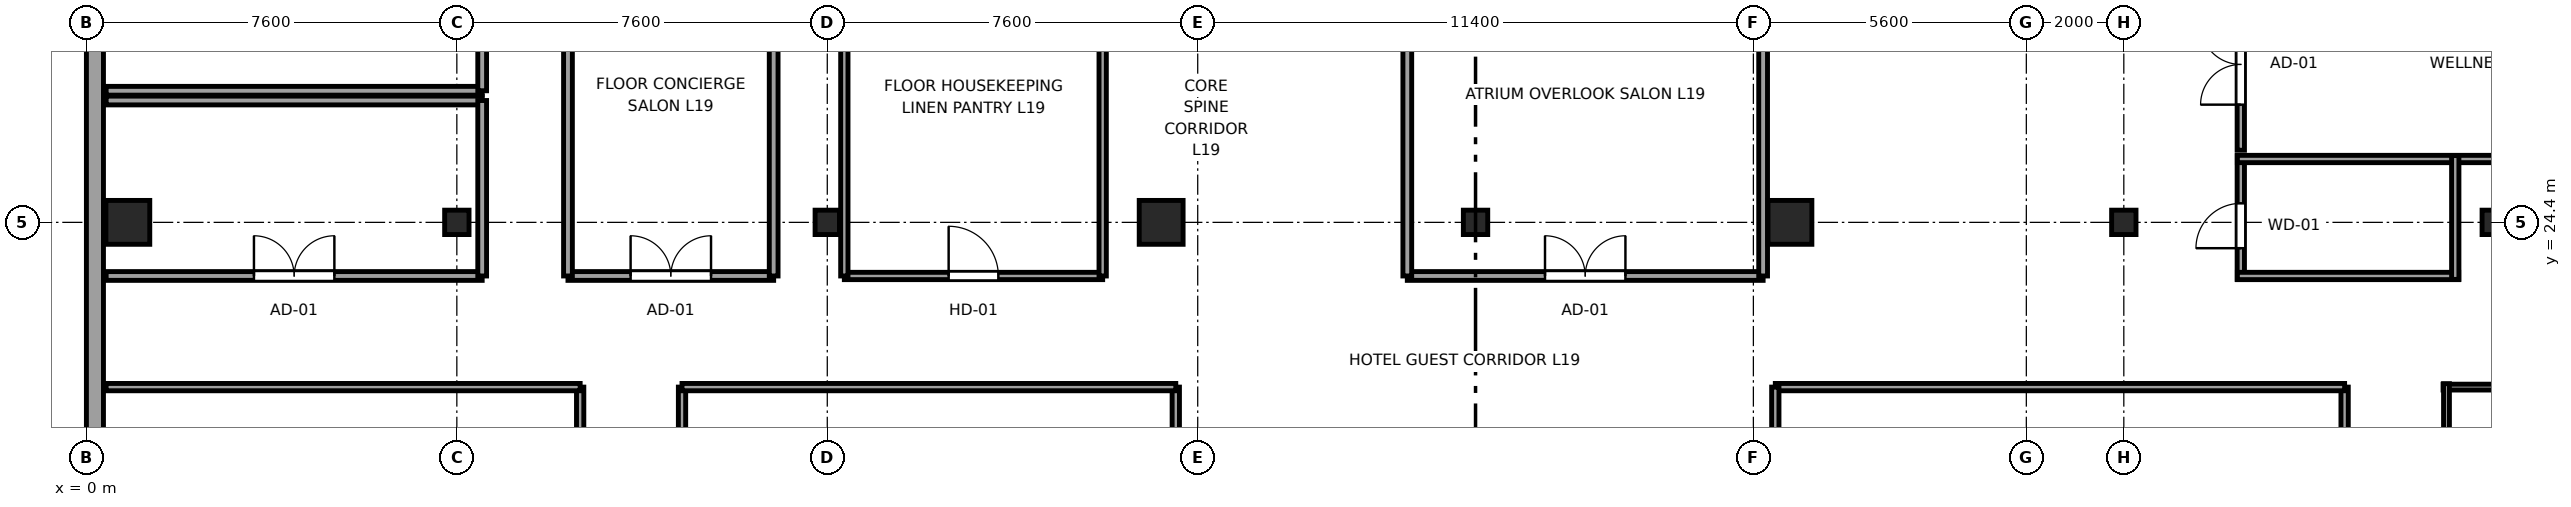
"""IFC4 building model, lengths in metres.
Left out: names, types, materials, properties, quantities, classifications, styles, units other than length and angle.
Written with IfcOpenShell. Run it as: python <this file> out.ifc"""

import sys

from ifc_helpers import new_model, si_unit, direction, frame, frame_2d, origin, origin_2d, place, context, subcontext, project, spatial, rectangle, i_section, extrude, source, transform, mapped, element, fill, save


model = new_model("IFC4")
c1 = context("Model", 3, precision=1e-05, world=origin(), true_north=direction((0.0, 1.0)))
c2 = subcontext(c1, "Body", "Model", "MODEL_VIEW")
j1 = project(units=[si_unit("LENGTHUNIT", "METRE"), si_unit("PLANEANGLEUNIT", "RADIAN")], contexts=[c1])
p1 = place(None, origin())
s1 = spatial("IfcSite", under=j1, at=p1, CompositionType="ELEMENT")
p2 = place(p1, origin())
s2 = spatial("IfcBuilding", under=s1, at=p2, CompositionType="ELEMENT")
p3 = place(p2, frame((0.0, 0.0, 78.15)))
s3 = spatial("IfcBuildingStorey", under=s2, at=p3, CompositionType="ELEMENT", Elevation=78.15)
m1 = source(origin(), c2, "Body", "SweptSolid", [
    extrude(rectangle(XDim=0.9, YDim=0.9, at=origin_2d()), origin(), (0.0, 0.0, 1.0), 3.55),
])
p4 = place(p3, frame((0.85, 24.4, 0.0), z_axis=(0.0, 0.0, 1.0), x_axis=(1.0, 0.0, 0.0)))
e1 = element("IfcColumn", 1, at=p4, inside=s3, PredefinedType="COLUMN", context=c2, shape_type="MappedRepresentation", body=[
    mapped(m1, transform((0.0, 0.0, 0.0), x_axis=(1.0, 0.0, 0.0), y_axis=(0.0, 1.0, 0.0), z_axis=(0.0, 0.0, 1.0), scale=1.0)),
])
m2 = source(origin(), c2, "Body", "SweptSolid", [
    extrude(i_section(OverallWidth=0.5, OverallDepth=0.5, WebThickness=0.022, FlangeThickness=0.034, at=origin_2d()), origin(), (0.0, 0.0, 1.0), 3.55),
])
for number, where, z_axis, x_axis in (
    (2, (7.6, 24.4, 0.0), (0.0, 0.0, 1.0), (1.0, 0.0, 0.0)),
    (3, (15.2, 24.4, 0.0), (0.0, 0.0, 1.0), (1.0, 0.0, 0.0)),
):
    element("IfcColumn", number, at=place(p3, frame(where, z_axis=z_axis, x_axis=x_axis)), inside=s3, PredefinedType="COLUMN", context=c2, shape_type="MappedRepresentation", body=[
        mapped(m2, transform((0.0, 0.0, 0.0), x_axis=(1.0, 0.0, 0.0), y_axis=(0.0, 1.0, 0.0), z_axis=(0.0, 0.0, 1.0), scale=1.0)),
    ])
for number, where, z_axis, x_axis in (
    (4, (22.05, 24.4, 0.0), (0.0, 0.0, 1.0), (1.0, 0.0, 0.0)),
    (5, (34.95, 24.4, 0.0), (0.0, 0.0, 1.0), (1.0, 0.0, 0.0)),
):
    element("IfcColumn", number, at=place(p3, frame(where, z_axis=z_axis, x_axis=x_axis)), inside=s3, PredefinedType="COLUMN", context=c2, shape_type="MappedRepresentation", body=[
        mapped(m1, transform((0.0, 0.0, 0.0), x_axis=(1.0, 0.0, 0.0), y_axis=(0.0, 1.0, 0.0), z_axis=(0.0, 0.0, 1.0), scale=1.0)),
    ])
for number, where, z_axis, x_axis in (
    (6, (41.8, 24.4, 0.0), (0.0, 0.0, 1.0), (1.0, 0.0, 0.0)),
    (7, (49.4, 24.4, 0.0), (0.0, 0.0, 1.0), (1.0, 0.0, 0.0)),
    (8, (28.5, 24.4, 0.0), (0.0, 0.0, 1.0), (1.0, 0.0, 0.0)),
):
    element("IfcColumn", number, at=place(p3, frame(where, z_axis=z_axis, x_axis=x_axis)), inside=s3, PredefinedType="COLUMN", context=c2, shape_type="MappedRepresentation", body=[
        mapped(m2, transform((0.0, 0.0, 0.0), x_axis=(1.0, 0.0, 0.0), y_axis=(0.0, 1.0, 0.0), z_axis=(0.0, 0.0, 1.0), scale=1.0)),
    ])
p5 = place(p3, frame((0.175, 41.383, 0.0), z_axis=(0.0, 0.0, 1.0), x_axis=(0.0, -1.0, 0.0)))
e9 = element("IfcWall", 9, at=p5, inside=s3, PredefinedType="SOLIDWALL", context=c2, shape_type="SweptSolid", body=[
    extrude(rectangle(XDim=36.766, YDim=0.35, at=frame_2d((18.383, 0.0))), origin(), (0.0, 0.0, 1.0), 3.37),
])
p6 = place(p5, frame((1.601, 0.0, 0.68)))
e10 = element("IfcOpeningElement", 10, at=p6, cuts=e9, PredefinedType="OPENING", context=c2, shape_type="SweptSolid", body=[
    extrude(rectangle(XDim=1.95, YDim=1.82, at=frame_2d((0.975, 0.91))), frame((0.0, 0.185, 0.0), z_axis=(0.0, -1.0, 0.0), x_axis=(1.0, 0.0, 0.0)), (0.0, 0.0, 1.0), 0.37),
])
p7 = place(p5, frame((4.503, 0.0, 0.68)))
e11 = element("IfcOpeningElement", 11, at=p7, cuts=e9, PredefinedType="OPENING", context=c2, shape_type="SweptSolid", body=[
    extrude(rectangle(XDim=1.95, YDim=1.82, at=frame_2d((0.975, 0.91))), frame((0.0, 0.185, 0.0), z_axis=(0.0, -1.0, 0.0), x_axis=(1.0, 0.0, 0.0)), (0.0, 0.0, 1.0), 0.37),
])
p8 = place(p5, frame((21.36, 0.0, 0.68)))
e12 = element("IfcOpeningElement", 12, at=p8, cuts=e9, PredefinedType="OPENING", context=c2, shape_type="SweptSolid", body=[
    extrude(rectangle(XDim=1.95, YDim=1.82, at=frame_2d((0.975, 0.91))), frame((0.0, 0.185, 0.0), z_axis=(0.0, -1.0, 0.0), x_axis=(1.0, 0.0, 0.0)), (0.0, 0.0, 1.0), 0.37),
])
p9 = place(p5, frame((26.361, 0.0, 0.68)))
e13 = element("IfcOpeningElement", 13, at=p9, cuts=e9, PredefinedType="OPENING", context=c2, shape_type="SweptSolid", body=[
    extrude(rectangle(XDim=1.95, YDim=1.82, at=frame_2d((0.975, 0.91))), frame((0.0, 0.185, 0.0), z_axis=(0.0, -1.0, 0.0), x_axis=(1.0, 0.0, 0.0)), (0.0, 0.0, 1.0), 0.37),
])
p10 = place(p5, frame((32.333, 0.0, 0.62)))
e14 = element("IfcOpeningElement", 14, at=p10, cuts=e9, PredefinedType="OPENING", context=c2, shape_type="SweptSolid", body=[
    extrude(rectangle(XDim=1.5, YDim=1.55, at=frame_2d((0.75, 0.775))), frame((0.0, 0.185, 0.0), z_axis=(0.0, -1.0, 0.0), x_axis=(1.0, 0.0, 0.0)), (0.0, 0.0, 1.0), 0.37),
])
p11 = place(p5, frame((11.733, 0.0, 0.62)))
e15 = element("IfcOpeningElement", 15, at=p11, cuts=e9, PredefinedType="OPENING", context=c2, shape_type="SweptSolid", body=[
    extrude(rectangle(XDim=1.5, YDim=1.55, at=frame_2d((0.75, 0.775))), frame((0.0, 0.185, 0.0), z_axis=(0.0, -1.0, 0.0), x_axis=(1.0, 0.0, 0.0)), (0.0, 0.0, 1.0), 0.37),
])
p12 = place(p3, frame((48.35, 21.02, 0.0), z_axis=(0.0, 0.0, 1.0), x_axis=(1.0, 0.0, 0.0)))
e16 = element("IfcWall", 16, at=p12, inside=s3, PredefinedType="PLUMBINGWALL", context=c2, shape_type="SweptSolid", body=[
    extrude(rectangle(XDim=2.59, YDim=0.12, at=frame_2d((1.295, 0.0))), origin(), (0.0, 0.0, 1.0), 3.37),
])
p13 = place(p3, frame((48.42, 18.7, 0.0), z_axis=(0.0, 0.0, 1.0), x_axis=(0.0, 1.0, 0.0)))
e17 = element("IfcWall", 17, at=p13, inside=s3, PredefinedType="PLUMBINGWALL", context=c2, shape_type="SweptSolid", body=[
    extrude(rectangle(XDim=2.39, YDim=0.12, at=frame_2d((1.195, 0.0))), origin(), (0.0, 0.0, 1.0), 3.37),
])
p14 = place(p3, frame((10.13, 18.21, 0.0), z_axis=(0.0, 0.0, 1.0), x_axis=(0.0, 1.0, 0.0)))
e18 = element("IfcWall", 18, at=p14, inside=s3, PredefinedType="PARTITIONING", context=c2, shape_type="SweptSolid", body=[
    extrude(rectangle(XDim=2.81, YDim=0.15, at=frame_2d((1.405, 0.0))), origin(), (0.0, 0.0, 1.0), 3.37),
])
p15 = place(p14, frame((0.895, 0.0, 0.0)))
e19 = element("IfcOpeningElement", 19, at=p15, cuts=e18, PredefinedType="OPENING", context=c2, shape_type="SweptSolid", body=[
    extrude(rectangle(XDim=0.98, YDim=2.12, at=frame_2d((0.49, 1.06))), frame((0.0, 0.085, 0.0), z_axis=(0.0, -1.0, 0.0), x_axis=(1.0, 0.0, 0.0)), (0.0, 0.0, 1.0), 0.17),
])
p16 = place(p3, frame((0.405, 21.02, 0.0), z_axis=(0.0, 0.0, 1.0), x_axis=(1.0, 0.0, 0.0)))
e20 = element("IfcWall", 20, at=p16, inside=s3, PredefinedType="PARTITIONING", context=c2, shape_type="SweptSolid", body=[
    extrude(rectangle(XDim=9.725, YDim=0.15, at=frame_2d((4.862, 0.0))), origin(), (0.0, 0.0, 1.0), 3.37),
])
p17 = place(p3, frame((12.22, 17.01, 0.0), z_axis=(0.0, 0.0, 1.0), x_axis=(0.0, 1.0, 0.0)))
e21 = element("IfcWall", 21, at=p17, inside=s3, PredefinedType="PARTITIONING", context=c2, shape_type="SweptSolid", body=[
    extrude(rectangle(XDim=4.01, YDim=0.15, at=frame_2d((2.005, 0.0))), origin(), (0.0, 0.0, 1.0), 3.37),
])
p18 = place(p17, frame((1.495, 0.0, 0.0)))
e22 = element("IfcOpeningElement", 22, at=p18, cuts=e21, PredefinedType="OPENING", context=c2, shape_type="SweptSolid", body=[
    extrude(rectangle(XDim=0.98, YDim=2.12, at=frame_2d((0.49, 1.06))), frame((0.0, 0.085, 0.0), z_axis=(0.0, -1.0, 0.0), x_axis=(1.0, 0.0, 0.0)), (0.0, 0.0, 1.0), 0.17),
])
p19 = place(p3, frame((22.35, 14.68, 0.0), z_axis=(0.0, 0.0, 1.0), x_axis=(0.0, 1.0, 0.0)))
e23 = element("IfcWall", 23, at=p19, inside=s3, PredefinedType="PARTITIONING", context=c2, shape_type="SweptSolid", body=[
    extrude(rectangle(XDim=6.34, YDim=0.15, at=frame_2d((3.17, 0.0))), origin(), (0.0, 0.0, 1.0), 3.37),
])
p20 = place(p3, frame((12.22, 21.02, 0.0), z_axis=(0.0, 0.0, 1.0), x_axis=(1.0, 0.0, 0.0)))
e24 = element("IfcWall", 24, at=p20, inside=s3, PredefinedType="PARTITIONING", context=c2, shape_type="SweptSolid", body=[
    extrude(rectangle(XDim=10.13, YDim=0.15, at=frame_2d((5.065, 0.0))), origin(), (0.0, 0.0, 1.0), 3.37),
])
p21 = place(p3, frame((46.33, 17.41, 0.0), z_axis=(0.0, 0.0, 1.0), x_axis=(0.0, 1.0, 0.0)))
e25 = element("IfcWall", 25, at=p21, inside=s3, PredefinedType="PARTITIONING", context=c2, shape_type="SweptSolid", body=[
    extrude(rectangle(XDim=3.61, YDim=0.15, at=frame_2d((1.805, 0.0))), origin(), (0.0, 0.0, 1.0), 3.37),
])
p22 = place(p21, frame((1.295, 0.0, 0.0)))
e26 = element("IfcOpeningElement", 26, at=p22, cuts=e25, PredefinedType="OPENING", context=c2, shape_type="SweptSolid", body=[
    extrude(rectangle(XDim=0.98, YDim=2.12, at=frame_2d((0.49, 1.06))), frame((0.0, 0.085, 0.0), z_axis=(0.0, -1.0, 0.0), x_axis=(1.0, 0.0, 0.0)), (0.0, 0.0, 1.0), 0.17),
])
p23 = place(p3, frame((34.65, 21.02, 0.0), z_axis=(0.0, 0.0, 1.0), x_axis=(1.0, 0.0, 0.0)))
e27 = element("IfcWall", 27, at=p23, inside=s3, PredefinedType="PARTITIONING", context=c2, shape_type="SweptSolid", body=[
    extrude(rectangle(XDim=11.68, YDim=0.15, at=frame_2d((5.84, 0.0))), origin(), (0.0, 0.0, 1.0), 3.37),
])
p24 = place(p3, frame((34.65, 15.08, 0.0), z_axis=(0.0, 0.0, 1.0), x_axis=(0.0, 1.0, 0.0)))
e28 = element("IfcWall", 28, at=p24, inside=s3, PredefinedType="PARTITIONING", context=c2, shape_type="SweptSolid", body=[
    extrude(rectangle(XDim=5.94, YDim=0.15, at=frame_2d((2.97, 0.0))), origin(), (0.0, 0.0, 1.0), 3.37),
])
p25 = place(p3, frame((0.405, 23.3, 0.0), z_axis=(0.0, 0.0, 1.0), x_axis=(1.0, 0.0, 0.0)))
e29 = element("IfcWall", 29, at=p25, inside=s3, PredefinedType="PARTITIONING", context=c2, shape_type="SweptSolid", body=[
    extrude(rectangle(XDim=7.715, YDim=0.18, at=frame_2d((3.857, 0.0))), origin(), (0.0, 0.0, 1.0), 3.37),
])
p26 = place(p25, frame((3.032, 0.0, 0.0)))
e30 = element("IfcOpeningElement", 30, at=p26, cuts=e29, PredefinedType="OPENING", context=c2, shape_type="SweptSolid", body=[
    extrude(rectangle(XDim=1.65, YDim=2.15, at=frame_2d((0.825, 1.075))), frame((0.0, 0.1, 0.0), z_axis=(0.0, -1.0, 0.0), x_axis=(1.0, 0.0, 0.0)), (0.0, 0.0, 1.0), 0.2),
])
p27 = place(p3, frame((0.405, 26.9, 0.0), z_axis=(0.0, 0.0, 1.0), x_axis=(1.0, 0.0, 0.0)))
e31 = element("IfcWall", 31, at=p27, inside=s3, PredefinedType="PARTITIONING", context=c2, shape_type="SweptSolid", body=[
    extrude(rectangle(XDim=7.715, YDim=0.18, at=frame_2d((3.857, 0.0))), origin(), (0.0, 0.0, 1.0), 3.37),
])
p28 = place(p3, frame((8.12, 23.3, 0.0), z_axis=(0.0, 0.0, 1.0), x_axis=(0.0, 1.0, 0.0)))
e32 = element("IfcWall", 32, at=p28, inside=s3, PredefinedType="PARTITIONING", context=c2, shape_type="SweptSolid", body=[
    extrude(rectangle(XDim=3.6, YDim=0.18, at=frame_2d((1.8, 0.0))), origin(), (0.0, 0.0, 1.0), 3.37),
])
p29 = place(p3, frame((0.405, 27.1, 0.0), z_axis=(0.0, 0.0, 1.0), x_axis=(1.0, 0.0, 0.0)))
e33 = element("IfcWall", 33, at=p29, inside=s3, PredefinedType="PARTITIONING", context=c2, shape_type="SweptSolid", body=[
    extrude(rectangle(XDim=7.715, YDim=0.18, at=frame_2d((3.857, 0.0))), origin(), (0.0, 0.0, 1.0), 3.37),
])
p30 = place(p3, frame((8.12, 27.1, 0.0), z_axis=(0.0, 0.0, 1.0), x_axis=(0.0, 1.0, 0.0)))
e34 = element("IfcWall", 34, at=p30, inside=s3, PredefinedType="PARTITIONING", context=c2, shape_type="SweptSolid", body=[
    extrude(rectangle(XDim=3.6, YDim=0.18, at=frame_2d((1.8, 0.0))), origin(), (0.0, 0.0, 1.0), 3.37),
])
p31 = place(p30, frame((0.975, 0.0, 0.0)))
e35 = element("IfcOpeningElement", 35, at=p31, cuts=e34, PredefinedType="OPENING", context=c2, shape_type="SweptSolid", body=[
    extrude(rectangle(XDim=1.65, YDim=2.15, at=frame_2d((0.825, 1.075))), frame((0.0, 0.1, 0.0), z_axis=(0.0, -1.0, 0.0), x_axis=(1.0, 0.0, 0.0)), (0.0, 0.0, 1.0), 0.2),
])
p32 = place(p3, frame((44.2, 23.23, 0.0), z_axis=(0.0, 0.0, 1.0), x_axis=(0.0, 1.0, 0.0)))
e36 = element("IfcWall", 36, at=p32, inside=s3, PredefinedType="PARTITIONING", context=c2, shape_type="SweptSolid", body=[
    extrude(rectangle(XDim=2.54, YDim=0.15, at=frame_2d((1.27, 0.0))), origin(), (0.0, 0.0, 1.0), 3.37),
])
p33 = place(p32, frame((0.64, 0.0, 0.0)))
e37 = element("IfcOpeningElement", 37, at=p33, cuts=e36, PredefinedType="OPENING", context=c2, shape_type="SweptSolid", body=[
    extrude(rectangle(XDim=0.92, YDim=2.01, at=frame_2d((0.46, 1.005))), frame((0.0, 0.085, 0.0), z_axis=(0.0, -1.0, 0.0), x_axis=(1.0, 0.0, 0.0)), (0.0, 0.0, 1.0), 0.17),
])
p34 = place(p3, frame((44.13, 23.3, 0.0), z_axis=(0.0, 0.0, 1.0), x_axis=(1.0, 0.0, 0.0)))
e38 = element("IfcWall", 38, at=p34, inside=s3, PredefinedType="PARTITIONING", context=c2, shape_type="SweptSolid", body=[
    extrude(rectangle(XDim=4.54, YDim=0.15, at=frame_2d((2.27, 0.0))), origin(), (0.0, 0.0, 1.0), 3.37),
])
p35 = place(p3, frame((44.13, 25.7, 0.0), z_axis=(0.0, 0.0, 1.0), x_axis=(1.0, 0.0, 0.0)))
e39 = element("IfcWall", 39, at=p35, inside=s3, PredefinedType="PARTITIONING", context=c2, shape_type="SweptSolid", body=[
    extrude(rectangle(XDim=12.57, YDim=0.15, at=frame_2d((6.285, 0.0))), origin(), (0.0, 0.0, 1.0), 3.37),
])
p36 = place(p3, frame((48.6, 23.23, 0.0), z_axis=(0.0, 0.0, 1.0), x_axis=(0.0, 1.0, 0.0)))
e40 = element("IfcWall", 40, at=p36, inside=s3, PredefinedType="PARTITIONING", context=c2, shape_type="SweptSolid", body=[
    extrude(rectangle(XDim=2.54, YDim=0.15, at=frame_2d((1.27, 0.0))), origin(), (0.0, 0.0, 1.0), 3.37),
])
p37 = place(p3, frame((44.2, 25.88, 0.0), z_axis=(0.0, 0.0, 1.0), x_axis=(0.0, 1.0, 0.0)))
e41 = element("IfcWall", 41, at=p37, inside=s3, PredefinedType="PARTITIONING", context=c2, shape_type="SweptSolid", body=[
    extrude(rectangle(XDim=3.52, YDim=0.15, at=frame_2d((1.76, 0.0))), origin(), (0.0, 0.0, 1.0), 3.37),
])
p38 = place(p37, frame((0.935, 0.0, 0.0)))
e42 = element("IfcOpeningElement", 42, at=p38, cuts=e41, PredefinedType="OPENING", context=c2, shape_type="SweptSolid", body=[
    extrude(rectangle(XDim=1.65, YDim=2.15, at=frame_2d((0.825, 1.075))), frame((0.0, 0.085, 0.0), z_axis=(0.0, -1.0, 0.0), x_axis=(1.0, 0.0, 0.0)), (0.0, 0.0, 1.0), 0.17),
])
p39 = place(p3, frame((9.88, 23.3, 0.0), z_axis=(0.0, 0.0, 1.0), x_axis=(1.0, 0.0, 0.0)))
e43 = element("IfcWall", 43, at=p39, inside=s3, PredefinedType="PARTITIONING", context=c2, shape_type="SweptSolid", body=[
    extrude(rectangle(XDim=4.22, YDim=0.18, at=frame_2d((2.11, 0.0))), origin(), (0.0, 0.0, 1.0), 3.37),
])
p40 = place(p39, frame((1.285, 0.0, 0.0)))
e44 = element("IfcOpeningElement", 44, at=p40, cuts=e43, PredefinedType="OPENING", context=c2, shape_type="SweptSolid", body=[
    extrude(rectangle(XDim=1.65, YDim=2.15, at=frame_2d((0.825, 1.075))), frame((0.0, 0.1, 0.0), z_axis=(0.0, -1.0, 0.0), x_axis=(1.0, 0.0, 0.0)), (0.0, 0.0, 1.0), 0.2),
])
for number, where, z_axis, x_axis in (
    (45, (9.88, 23.3, 0.0), (0.0, 0.0, 1.0), (0.0, 1.0, 0.0)),
    (46, (14.1, 23.3, 0.0), (0.0, 0.0, 1.0), (0.0, 1.0, 0.0)),
):
    element("IfcWall", number, at=place(p3, frame(where, z_axis=z_axis, x_axis=x_axis)), inside=s3, PredefinedType="PARTITIONING", context=c2, shape_type="SweptSolid", body=[
        extrude(rectangle(XDim=6.45, YDim=0.18, at=frame_2d((3.225, 0.0))), origin(), (0.0, 0.0, 1.0), 3.37),
    ])
p41 = place(p3, frame((27.1, 23.3, 0.0), z_axis=(0.0, 0.0, 1.0), x_axis=(1.0, 0.0, 0.0)))
e47 = element("IfcWall", 47, at=p41, inside=s3, PredefinedType="PARTITIONING", context=c2, shape_type="SweptSolid", body=[
    extrude(rectangle(XDim=7.3, YDim=0.18, at=frame_2d((3.65, 0.0))), origin(), (0.0, 0.0, 1.0), 3.37),
])
p42 = place(p41, frame((2.825, 0.0, 0.0)))
e48 = element("IfcOpeningElement", 48, at=p42, cuts=e47, PredefinedType="OPENING", context=c2, shape_type="SweptSolid", body=[
    extrude(rectangle(XDim=1.65, YDim=2.15, at=frame_2d((0.825, 1.075))), frame((0.0, 0.1, 0.0), z_axis=(0.0, -1.0, 0.0), x_axis=(1.0, 0.0, 0.0)), (0.0, 0.0, 1.0), 0.2),
])
for number, where, z_axis, x_axis in (
    (49, (27.1, 23.3, 0.0), (0.0, 0.0, 1.0), (0.0, 1.0, 0.0)),
    (50, (34.4, 23.3, 0.0), (0.0, 0.0, 1.0), (0.0, 1.0, 0.0)),
):
    element("IfcWall", number, at=place(p3, frame(where, z_axis=z_axis, x_axis=x_axis)), inside=s3, PredefinedType="PARTITIONING", context=c2, shape_type="SweptSolid", body=[
        extrude(rectangle(XDim=6.5, YDim=0.18, at=frame_2d((3.25, 0.0))), origin(), (0.0, 0.0, 1.0), 3.37),
    ])
p43 = place(p3, frame((15.55, 23.3, 0.0), z_axis=(0.0, 0.0, 1.0), x_axis=(1.0, 0.0, 0.0)))
e51 = element("IfcWall", 51, at=p43, inside=s3, PredefinedType="PARTITIONING", context=c2, shape_type="SweptSolid", body=[
    extrude(rectangle(XDim=5.3, YDim=0.15, at=frame_2d((2.65, 0.0))), origin(), (0.0, 0.0, 1.0), 3.37),
])
p44 = place(p43, frame((2.14, 0.0, 0.0)))
e52 = element("IfcOpeningElement", 52, at=p44, cuts=e51, PredefinedType="OPENING", context=c2, shape_type="SweptSolid", body=[
    extrude(rectangle(XDim=1.02, YDim=2.03, at=frame_2d((0.51, 1.015))), frame((0.0, 0.085, 0.0), z_axis=(0.0, -1.0, 0.0), x_axis=(1.0, 0.0, 0.0)), (0.0, 0.0, 1.0), 0.17),
])
for number, where, z_axis, x_axis in (
    (53, (15.55, 23.3, 0.0), (0.0, 0.0, 1.0), (0.0, 1.0, 0.0)),
    (54, (20.85, 23.3, 0.0), (0.0, 0.0, 1.0), (0.0, 1.0, 0.0)),
):
    element("IfcWall", number, at=place(p3, frame(where, z_axis=z_axis, x_axis=x_axis)), inside=s3, PredefinedType="PARTITIONING", context=c2, shape_type="SweptSolid", body=[
        extrude(rectangle(XDim=6.5, YDim=0.15, at=frame_2d((3.25, 0.0))), origin(), (0.0, 0.0, 1.0), 3.37),
    ])
m3 = source(origin(), c2, "Body", "SweptSolid", [
    extrude(rectangle(XDim=1.65, YDim=2.15, at=frame_2d((0.825, 1.075))), frame((0.0, 0.025, 0.0), z_axis=(0.0, -1.0, 0.0), x_axis=(1.0, 0.0, 0.0)), (0.0, 0.0, 1.0), 0.05),
])
p45 = place(p26, origin())
e55 = element("IfcDoor", 55, at=p45, inside=s3, OperationType="DOUBLE_DOOR_SINGLE_SWING", PredefinedType="DOOR", context=c2, shape_type="MappedRepresentation", body=[
    mapped(m3, transform((0.0, 0.0, 0.0), x_axis=(1.0, 0.0, 0.0), y_axis=(0.0, 1.0, 0.0), z_axis=(0.0, 0.0, 1.0), scale=1.0)),
])
fill(e30, e55)
m4 = source(origin(), c2, "Body", "SweptSolid", [
    extrude(rectangle(XDim=0.92, YDim=2.01, at=frame_2d((0.46, 1.005))), frame((0.0, 0.025, 0.0), z_axis=(0.0, -1.0, 0.0), x_axis=(1.0, 0.0, 0.0)), (0.0, 0.0, 1.0), 0.05),
])
p46 = place(p33, origin())
e56 = element("IfcDoor", 56, at=p46, inside=s3, OperationType="SINGLE_SWING_LEFT", PredefinedType="DOOR", context=c2, shape_type="MappedRepresentation", body=[
    mapped(m4, transform((0.0, 0.0, 0.0), x_axis=(1.0, 0.0, 0.0), y_axis=(0.0, 1.0, 0.0), z_axis=(0.0, 0.0, 1.0), scale=1.0)),
])
fill(e37, e56)
p47 = place(p38, origin())
e57 = element("IfcDoor", 57, at=p47, inside=s3, OperationType="DOUBLE_DOOR_SINGLE_SWING", PredefinedType="DOOR", context=c2, shape_type="MappedRepresentation", body=[
    mapped(m3, transform((0.0, 0.0, 0.0), x_axis=(1.0, 0.0, 0.0), y_axis=(0.0, 1.0, 0.0), z_axis=(0.0, 0.0, 1.0), scale=1.0)),
])
fill(e42, e57)
p48 = place(p40, origin())
e58 = element("IfcDoor", 58, at=p48, inside=s3, OperationType="DOUBLE_DOOR_SINGLE_SWING", PredefinedType="DOOR", context=c2, shape_type="MappedRepresentation", body=[
    mapped(m3, transform((0.0, 0.0, 0.0), x_axis=(1.0, 0.0, 0.0), y_axis=(0.0, 1.0, 0.0), z_axis=(0.0, 0.0, 1.0), scale=1.0)),
])
fill(e44, e58)
p49 = place(p42, origin())
e59 = element("IfcDoor", 59, at=p49, inside=s3, OperationType="DOUBLE_DOOR_SINGLE_SWING", PredefinedType="DOOR", context=c2, shape_type="MappedRepresentation", body=[
    mapped(m3, transform((0.0, 0.0, 0.0), x_axis=(1.0, 0.0, 0.0), y_axis=(0.0, 1.0, 0.0), z_axis=(0.0, 0.0, 1.0), scale=1.0)),
])
fill(e48, e59)
m5 = source(origin(), c2, "Body", "SweptSolid", [
    extrude(rectangle(XDim=1.02, YDim=2.03, at=frame_2d((0.51, 1.015))), frame((0.0, 0.025, 0.0), z_axis=(0.0, -1.0, 0.0), x_axis=(1.0, 0.0, 0.0)), (0.0, 0.0, 1.0), 0.05),
])
p50 = place(p44, origin())
e60 = element("IfcDoor", 60, at=p50, inside=s3, OperationType="SINGLE_SWING_LEFT", PredefinedType="DOOR", context=c2, shape_type="MappedRepresentation", body=[
    mapped(m5, transform((0.0, 0.0, 0.0), x_axis=(1.0, 0.0, 0.0), y_axis=(0.0, 1.0, 0.0), z_axis=(0.0, 0.0, 1.0), scale=1.0)),
])
fill(e52, e60)
save(model, sys.argv[1])
